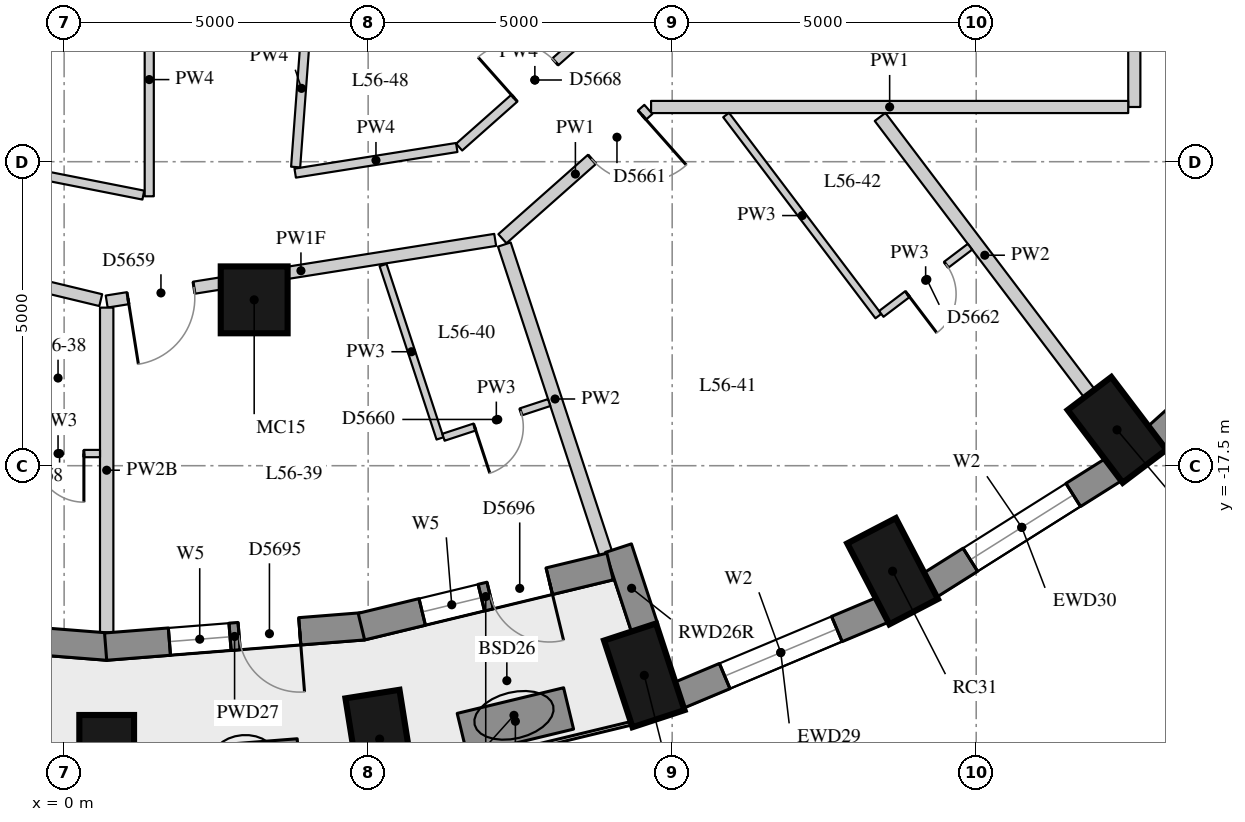
"""IFC4 building model, lengths in metres.
Left out: names, types, materials, properties, quantities, classifications, styles, units other than length and angle.
Written with IfcOpenShell. Run it as: python <this file> out.ifc"""

import sys

from ifc_helpers import new_model, si_unit, direction, frame, frame_2d, origin, origin_2d, place, context, subcontext, project, spatial, rectangle, extrude, element, fill, save


model = new_model("IFC4")
c1 = context("Model", 3, precision=1e-05, world=origin(), true_north=direction((0.0, 1.0)))
c2 = subcontext(c1, "Body", "Model", "MODEL_VIEW")
j1 = project(units=[si_unit("LENGTHUNIT", "METRE"), si_unit("PLANEANGLEUNIT", "RADIAN")], contexts=[c1])
p1 = place(None, origin())
s1 = spatial("IfcSite", under=j1, at=p1, CompositionType="ELEMENT")
p2 = place(p1, origin())
s2 = spatial("IfcBuilding", under=s1, at=p2, CompositionType="ELEMENT")
p3 = place(p2, frame((0.0, 0.0, 199.1)))
s3 = spatial("IfcBuildingStorey", under=s2, at=p3, CompositionType="ELEMENT", Elevation=199.1)
for number, where, z_axis, x_axis in (
    (1, (0.7, -22.35, 0.0), (0.0, 0.0, 1.0), (0.0, -1.0, 0.0)),
    (2, (5.189, -21.997, 0.0), (0.0, 0.0, 1.0), (0.157, -0.988, 0.0)),
    (3, (9.541, -20.948, 0.0), (0.0, 0.0, 1.0), (0.312, -0.95, 0.0)),
    (4, (13.625, -19.235, 0.0), (0.0, 0.0, 1.0), (0.462, -0.887, 0.0)),
    (5, (17.316, -16.911, 0.0), (0.0, 0.0, 1.0), (0.604, -0.797, 0.0)),
):
    element("IfcColumn", number, at=place(p3, frame(where, z_axis=z_axis, x_axis=x_axis)), inside=s3, PredefinedType="COLUMN", context=c2, shape_type="SweptSolid", body=[
        extrude(rectangle(XDim=1.5, YDim=0.9, at=origin_2d()), origin(), (0.0, 0.0, 1.0), 3.3),
    ])
p4 = place(p3, frame((3.126, -14.772, 0.0), z_axis=(0.0, 0.0, 1.0), x_axis=(1.0, 0.0, 0.0)))
e6 = element("IfcColumn", 6, at=p4, inside=s3, PredefinedType="COLUMN", context=c2, shape_type="SweptSolid", body=[
    extrude(rectangle(XDim=1.1, YDim=1.1, at=origin_2d()), origin(), (0.0, 0.0, 1.0), 3.3),
])
p5 = place(p3, frame((10.103, -21.279, 0.0), z_axis=(0.0, 0.0, 1.0), x_axis=(0.922168222612, 0.386789050006, 0.0)))
e7 = element("IfcWall", 7, at=p5, inside=s3, PredefinedType="SOLIDWALL", context=c2, shape_type="SweptSolid", body=[
    extrude(rectangle(XDim=3.651, YDim=0.45, at=frame_2d((1.825, 0.0))), origin(), (0.0, 0.0, 1.0), 3.02),
])
p6 = place(p5, frame((0.825, 0.0, 0.4)))
e8 = element("IfcOpeningElement", 8, at=p6, cuts=e7, PredefinedType="OPENING", context=c2, shape_type="SweptSolid", body=[
    extrude(rectangle(XDim=2.0, YDim=1.75, at=frame_2d((1.0, 0.875))), frame((0.0, 0.235, 0.0), z_axis=(0.0, -1.0, 0.0), x_axis=(1.0, 0.0, 0.0)), (0.0, 0.0, 1.0), 0.47),
])
p7 = place(p3, frame((14.232, -19.47, 0.0), z_axis=(0.0, 0.0, 1.0), x_axis=(0.84614984472, 0.532945063098, 0.0)))
e9 = element("IfcWall", 9, at=p7, inside=s3, PredefinedType="SOLIDWALL", context=c2, shape_type="SweptSolid", body=[
    extrude(rectangle(XDim=3.586, YDim=0.45, at=frame_2d((1.793, 0.0))), origin(), (0.0, 0.0, 1.0), 3.02),
])
p8 = place(p7, frame((0.793, 0.0, 0.4)))
e10 = element("IfcOpeningElement", 10, at=p8, cuts=e9, PredefinedType="OPENING", context=c2, shape_type="SweptSolid", body=[
    extrude(rectangle(XDim=2.0, YDim=1.75, at=frame_2d((1.0, 0.875))), frame((0.0, 0.235, 0.0), z_axis=(0.0, -1.0, 0.0), x_axis=(1.0, 0.0, 0.0)), (0.0, 0.0, 1.0), 0.47),
])
p9 = place(p3, frame((17.953, -17.04, 0.0), z_axis=(0.0, 0.0, 1.0), x_axis=(0.743442727602, 0.668799604348, 0.0)))
e11 = element("IfcWall", 11, at=p9, inside=s3, PredefinedType="SOLIDWALL", context=c2, shape_type="SweptSolid", body=[
    extrude(rectangle(XDim=3.513, YDim=0.45, at=frame_2d((1.756, 0.0))), origin(), (0.0, 0.0, 1.0), 3.02),
])
p10 = place(p3, frame((9.55, -20.177, 0.0), z_axis=(0.0, 0.0, 1.0), x_axis=(-0.31201065878, 0.950078601384, 0.0)))
e12 = element("IfcWall", 12, at=p10, inside=s3, PredefinedType="SOLIDWALL", context=c2, shape_type="SweptSolid", body=[
    extrude(rectangle(XDim=1.39, YDim=0.45, at=frame_2d((0.695, 0.0))), origin(), (0.0, 0.0, 1.0), 3.02),
])
p11 = place(p3, frame((-3.507, -20.142, 0.0), z_axis=(0.0, 0.0, 1.0), x_axis=(0.996902786213, -0.078643720926, 0.0)))
e13 = element("IfcWall", 13, at=p11, inside=s3, PredefinedType="SOLIDWALL", context=c2, shape_type="SweptSolid", body=[
    extrude(rectangle(XDim=4.238, YDim=0.45, at=frame_2d((2.119, 0.0))), origin(), (0.0, 0.0, 1.0), 3.02),
])
p12 = place(p11, frame((1.044, 0.0, 0.4)))
e14 = element("IfcOpeningElement", 14, at=p12, cuts=e13, PredefinedType="OPENING", context=c2, shape_type="SweptSolid", body=[
    extrude(rectangle(XDim=1.0, YDim=1.75, at=frame_2d((0.5, 0.875))), frame((0.0, 0.235, 0.0), z_axis=(0.0, -1.0, 0.0), x_axis=(1.0, 0.0, 0.0)), (0.0, 0.0, 1.0), 0.47),
])
p13 = place(p11, frame((2.194, 0.0, 0.0)))
e15 = element("IfcOpeningElement", 15, at=p13, cuts=e13, PredefinedType="OPENING", context=c2, shape_type="SweptSolid", body=[
    extrude(rectangle(XDim=1.0, YDim=2.15, at=frame_2d((0.5, 1.075))), frame((0.0, 0.235, 0.0), z_axis=(0.0, -1.0, 0.0), x_axis=(1.0, 0.0, 0.0)), (0.0, 0.0, 1.0), 0.47),
])
p14 = place(p3, frame((0.682, -20.476, 0.0), z_axis=(0.0, 0.0, 1.0), x_axis=(0.996901346333, 0.078661970983, 0.0)))
e16 = element("IfcWall", 16, at=p14, inside=s3, PredefinedType="SOLIDWALL", context=c2, shape_type="SweptSolid", body=[
    extrude(rectangle(XDim=4.255, YDim=0.45, at=frame_2d((2.127, 0.0))), origin(), (0.0, 0.0, 1.0), 3.02),
])
p15 = place(p14, frame((1.052, 0.0, 0.4)))
e17 = element("IfcOpeningElement", 17, at=p15, cuts=e16, PredefinedType="OPENING", context=c2, shape_type="SweptSolid", body=[
    extrude(rectangle(XDim=1.0, YDim=1.75, at=frame_2d((0.5, 0.875))), frame((0.0, 0.235, 0.0), z_axis=(0.0, -1.0, 0.0), x_axis=(1.0, 0.0, 0.0)), (0.0, 0.0, 1.0), 0.47),
])
p16 = place(p14, frame((2.203, 0.0, 0.0)))
e18 = element("IfcOpeningElement", 18, at=p16, cuts=e16, PredefinedType="OPENING", context=c2, shape_type="SweptSolid", body=[
    extrude(rectangle(XDim=1.0, YDim=2.15, at=frame_2d((0.5, 1.075))), frame((0.0, 0.235, 0.0), z_axis=(0.0, -1.0, 0.0), x_axis=(1.0, 0.0, 0.0)), (0.0, 0.0, 1.0), 0.47),
])
p17 = place(p3, frame((4.889, -20.146, 0.0), z_axis=(0.0, 0.0, 1.0), x_axis=(0.972004107579, 0.234963858602, 0.0)))
e19 = element("IfcWall", 19, at=p17, inside=s3, PredefinedType="SOLIDWALL", context=c2, shape_type="SweptSolid", body=[
    extrude(rectangle(XDim=4.207, YDim=0.45, at=frame_2d((2.104, 0.0))), origin(), (0.0, 0.0, 1.0), 3.02),
])
p18 = place(p17, frame((1.029, 0.0, 0.4)))
e20 = element("IfcOpeningElement", 20, at=p18, cuts=e19, PredefinedType="OPENING", context=c2, shape_type="SweptSolid", body=[
    extrude(rectangle(XDim=1.0, YDim=1.75, at=frame_2d((0.5, 0.875))), frame((0.0, 0.235, 0.0), z_axis=(0.0, -1.0, 0.0), x_axis=(1.0, 0.0, 0.0)), (0.0, 0.0, 1.0), 0.47),
])
p19 = place(p17, frame((2.179, 0.0, 0.0)))
e21 = element("IfcOpeningElement", 21, at=p19, cuts=e19, PredefinedType="OPENING", context=c2, shape_type="SweptSolid", body=[
    extrude(rectangle(XDim=1.0, YDim=2.15, at=frame_2d((0.5, 1.075))), frame((0.0, 0.235, 0.0), z_axis=(0.0, -1.0, 0.0), x_axis=(1.0, 0.0, 0.0)), (0.0, 0.0, 1.0), 0.47),
])
for number, where, z_axis, x_axis in (
    (22, (2.066, -22.481, 0.0), (0.0, 0.0, 1.0), (0.997, 0.079, 0.0)),
    (23, (6.546, -21.914, 0.0), (0.0, 0.0, 1.0), (0.972, 0.234, 0.0)),
):
    element("IfcWall", number, at=place(p3, frame(where, z_axis=z_axis, x_axis=x_axis)), inside=s3, PredefinedType="USERDEFINED", context=c2, shape_type="SweptSolid", body=[
        extrude(rectangle(XDim=1.8, YDim=0.7, at=frame_2d((0.9, 0.0))), origin(), (0.0, 0.0, 1.0), 0.75),
    ])
p20 = place(p3, frame((17.6, -4.617, 0.0), z_axis=(0.0, 0.0, 1.0), x_axis=(0.0, -1.0, 0.0)))
e24 = element("IfcWall", 24, at=p20, inside=s3, PredefinedType="PARTITIONING", context=c2, shape_type="SweptSolid", body=[
    extrude(rectangle(XDim=6.983, YDim=0.2, at=frame_2d((3.492, 0.0))), origin(), (0.0, 0.0, 1.0), 3.02),
])
p21 = place(p20, frame((2.592, 0.0, 0.0)))
e25 = element("IfcOpeningElement", 25, at=p21, cuts=e24, PredefinedType="OPENING", context=c2, shape_type="SweptSolid", body=[
    extrude(rectangle(XDim=1.8, YDim=2.1, at=frame_2d((0.9, 1.05))), frame((0.0, 0.11, 0.0), z_axis=(0.0, -1.0, 0.0), x_axis=(1.0, 0.0, 0.0)), (0.0, 0.0, 1.0), 0.22),
])
p22 = place(p3, frame((17.5, -11.6, 0.0), z_axis=(0.0, 0.0, 1.0), x_axis=(-1.0, 0.0, 0.0)))
e26 = element("IfcWall", 26, at=p22, inside=s3, PredefinedType="PARTITIONING", context=c2, shape_type="SweptSolid", body=[
    extrude(rectangle(XDim=7.847, YDim=0.2, at=frame_2d((3.923, 0.0))), origin(), (0.0, 0.0, 1.0), 3.02),
])
p23 = place(p3, frame((9.608, -11.64, 0.0), z_axis=(0.0, 0.0, 1.0), x_axis=(-0.748412200225, -0.663233879227, 0.0)))
e27 = element("IfcWall", 27, at=p23, inside=s3, PredefinedType="PARTITIONING", context=c2, shape_type="SweptSolid", body=[
    extrude(rectangle(XDim=3.207, YDim=0.2, at=frame_2d((1.604, 0.0))), origin(), (0.0, 0.0, 1.0), 3.02),
])
p24 = place(p23, frame((0.14, 0.0, 0.0)))
e28 = element("IfcOpeningElement", 28, at=p24, cuts=e27, PredefinedType="OPENING", context=c2, shape_type="SweptSolid", body=[
    extrude(rectangle(XDim=1.1, YDim=2.1, at=frame_2d((0.55, 1.05))), frame((0.0, 0.11, 0.0), z_axis=(0.0, -1.0, 0.0), x_axis=(1.0, 0.0, 0.0)), (0.0, 0.0, 1.0), 0.22),
])
p25 = place(p3, frame((7.089, -13.786, 0.0), z_axis=(0.0, 0.0, 1.0), x_axis=(-0.987636270411, -0.156762869867, 0.0)))
e29 = element("IfcWall", 29, at=p25, inside=s3, PredefinedType="PARTITIONING", context=c2, shape_type="SweptSolid", body=[
    extrude(rectangle(XDim=6.469, YDim=0.2, at=frame_2d((3.235, 0.0))), origin(), (0.0, 0.0, 1.0), 2.42),
])
p26 = place(p25, frame((5.016, 0.0, 0.0)))
e30 = element("IfcOpeningElement", 30, at=p26, cuts=e29, PredefinedType="OPENING", context=c2, shape_type="SweptSolid", body=[
    extrude(rectangle(XDim=1.1, YDim=2.1, at=frame_2d((0.55, 1.05))), frame((0.0, 0.11, 0.0), z_axis=(0.0, -1.0, 0.0), x_axis=(1.0, 0.0, 0.0)), (0.0, 0.0, 1.0), 0.22),
])
p27 = place(p3, frame((0.602, -14.777, 0.0), z_axis=(0.0, 0.0, 1.0), x_axis=(-0.972266752798, 0.23387467029, 0.0)))
e31 = element("IfcWall", 31, at=p27, inside=s3, PredefinedType="PARTITIONING", context=c2, shape_type="SweptSolid", body=[
    extrude(rectangle(XDim=8.539, YDim=0.2, at=frame_2d((4.27, 0.0))), origin(), (0.0, 0.0, 1.0), 2.42),
])
p28 = place(p27, frame((7.016, 0.0, 0.0)))
e32 = element("IfcOpeningElement", 32, at=p28, cuts=e31, PredefinedType="OPENING", context=c2, shape_type="SweptSolid", body=[
    extrude(rectangle(XDim=0.9, YDim=2.1, at=frame_2d((0.45, 1.05))), frame((0.0, 0.11, 0.0), z_axis=(0.0, -1.0, 0.0), x_axis=(1.0, 0.0, 0.0)), (0.0, 0.0, 1.0), 0.22),
])
p29 = place(p27, frame((4.565, 0.0, 0.0)))
e33 = element("IfcOpeningElement", 33, at=p29, cuts=e31, PredefinedType="OPENING", context=c2, shape_type="SweptSolid", body=[
    extrude(rectangle(XDim=0.9, YDim=2.1, at=frame_2d((0.45, 1.05))), frame((0.0, 0.11, 0.0), z_axis=(0.0, -1.0, 0.0), x_axis=(1.0, 0.0, 0.0)), (0.0, 0.0, 1.0), 0.22),
])
p30 = place(p27, frame((1.78, 0.0, 0.0)))
e34 = element("IfcOpeningElement", 34, at=p30, cuts=e31, PredefinedType="OPENING", context=c2, shape_type="SweptSolid", body=[
    extrude(rectangle(XDim=0.9, YDim=2.1, at=frame_2d((0.45, 1.05))), frame((0.0, 0.11, 0.0), z_axis=(0.0, -1.0, 0.0), x_axis=(1.0, 0.0, 0.0)), (0.0, 0.0, 1.0), 0.22),
])
p31 = place(p3, frame((1.4, -9.23, 0.0), z_axis=(0.0, 0.0, 1.0), x_axis=(0.0, -1.0, 0.0)))
e35 = element("IfcWall", 35, at=p31, inside=s3, PredefinedType="PARTITIONING", context=c2, shape_type="SweptSolid", body=[
    extrude(rectangle(XDim=3.839, YDim=0.15, at=frame_2d((1.919, 0.0))), origin(), (0.0, 0.0, 1.0), 3.02),
])
p32 = place(p3, frame((1.302, -13.049, 0.0), z_axis=(0.0, 0.0, 1.0), x_axis=(-0.981063502149, 0.193686356647, 0.0)))
e36 = element("IfcWall", 36, at=p32, inside=s3, PredefinedType="PARTITIONING", context=c2, shape_type="SweptSolid", body=[
    extrude(rectangle(XDim=5.914, YDim=0.15, at=frame_2d((2.957, 0.0))), origin(), (0.0, 0.0, 1.0), 3.02),
])
p33 = place(p3, frame((8.987, -10.052, 0.0), z_axis=(0.0, 0.0, 1.0), x_axis=(-0.74833949077, -0.66331591761, 0.0)))
e37 = element("IfcWall", 37, at=p33, inside=s3, PredefinedType="PARTITIONING", context=c2, shape_type="SweptSolid", body=[
    extrude(rectangle(XDim=3.328, YDim=0.15, at=frame_2d((1.664, 0.0))), origin(), (0.0, 0.0, 1.0), 3.02),
])
p34 = place(p33, frame((1.214, 0.0, 0.0)))
e38 = element("IfcOpeningElement", 38, at=p34, cuts=e37, PredefinedType="OPENING", context=c2, shape_type="SweptSolid", body=[
    extrude(rectangle(XDim=0.9, YDim=2.1, at=frame_2d((0.45, 1.05))), frame((0.0, 0.085, 0.0), z_axis=(0.0, -1.0, 0.0), x_axis=(1.0, 0.0, 0.0)), (0.0, 0.0, 1.0), 0.17),
])
p35 = place(p3, frame((6.457, -12.266, 0.0), z_axis=(0.0, 0.0, 1.0), x_axis=(-0.987639766053, -0.156740845063, 0.0)))
e39 = element("IfcWall", 39, at=p35, inside=s3, PredefinedType="PARTITIONING", context=c2, shape_type="SweptSolid", body=[
    extrude(rectangle(XDim=2.69, YDim=0.15, at=frame_2d((1.345, 0.0))), origin(), (0.0, 0.0, 1.0), 3.02),
])
p36 = place(p3, frame((3.807, -12.588, 0.0), z_axis=(0.0, 0.0, 1.0), x_axis=(0.07420077159, 0.997243323114, 0.0)))
e40 = element("IfcWall", 40, at=p36, inside=s3, PredefinedType="PARTITIONING", context=c2, shape_type="SweptSolid", body=[
    extrude(rectangle(XDim=2.596, YDim=0.15, at=frame_2d((1.298, 0.0))), origin(), (0.0, 0.0, 1.0), 3.02),
])
p37 = place(p3, frame((0.7, -20.249, 0.0), z_axis=(0.0, 0.0, 1.0), x_axis=(0.0, 1.0, 0.0)))
e41 = element("IfcWall", 41, at=p37, inside=s3, PredefinedType="PARTITIONING", context=c2, shape_type="SweptSolid", body=[
    extrude(rectangle(XDim=5.348, YDim=0.22, at=frame_2d((2.674, 0.0))), origin(), (0.0, 0.0, 1.0), 2.57),
])
p38 = place(p3, frame((8.908, -18.944, 0.0), z_axis=(0.0, 0.0, 1.0), x_axis=(-0.311910788491, 0.950111393481, 0.0)))
e42 = element("IfcWall", 42, at=p38, inside=s3, PredefinedType="PARTITIONING", context=c2, shape_type="SweptSolid", body=[
    extrude(rectangle(XDim=5.348, YDim=0.22, at=frame_2d((2.674, 0.0))), origin(), (0.0, 0.0, 1.0), 3.02),
])
p39 = place(p3, frame((16.863, -16.312, 0.0), z_axis=(0.0, 0.0, 1.0), x_axis=(-0.603636051313, 0.797260006243, 0.0)))
e43 = element("IfcWall", 43, at=p39, inside=s3, PredefinedType="PARTITIONING", context=c2, shape_type="SweptSolid", body=[
    extrude(rectangle(XDim=5.706, YDim=0.22, at=frame_2d((2.853, 0.0))), origin(), (0.0, 0.0, 1.0), 3.02),
])
p40 = place(p3, frame((5.245, -14.2, 0.0), z_axis=(0.0, 0.0, 1.0), x_axis=(0.31202743032, -0.950073093361, 0.0)))
e44 = element("IfcWall", 44, at=p40, inside=s3, PredefinedType="PARTITIONING", context=c2, shape_type="SweptSolid", body=[
    extrude(rectangle(XDim=3.001, YDim=0.12, at=frame_2d((1.501, 0.0))), origin(), (0.0, 0.0, 1.0), 3.02),
])
p41 = place(p3, frame((10.887, -11.732, 0.0), z_axis=(0.0, 0.0, 1.0), x_axis=(0.603646932038, -0.797251767913, 0.0)))
e45 = element("IfcWall", 45, at=p41, inside=s3, PredefinedType="PARTITIONING", context=c2, shape_type="SweptSolid", body=[
    extrude(rectangle(XDim=4.149, YDim=0.12, at=frame_2d((2.074, 0.0))), origin(), (0.0, 0.0, 1.0), 3.02),
])
p42 = place(p3, frame((-0.79, -17.3, 0.0), z_axis=(0.0, 0.0, 1.0), x_axis=(1.0, 0.0, 0.0)))
e46 = element("IfcWall", 46, at=p42, inside=s3, PredefinedType="PARTITIONING", context=c2, shape_type="SweptSolid", body=[
    extrude(rectangle(XDim=1.38, YDim=0.12, at=frame_2d((0.69, 0.0))), origin(), (0.0, 0.0, 1.0), 3.02),
])
p43 = place(p42, frame((0.315, 0.0, 0.0)))
e47 = element("IfcOpeningElement", 47, at=p43, cuts=e46, PredefinedType="OPENING", context=c2, shape_type="SweptSolid", body=[
    extrude(rectangle(XDim=0.8, YDim=2.1, at=frame_2d((0.4, 1.05))), frame((0.0, 0.07, 0.0), z_axis=(0.0, -1.0, 0.0), x_axis=(1.0, 0.0, 0.0)), (0.0, 0.0, 1.0), 0.14),
])
p44 = place(p3, frame((6.239, -17.032, 0.0), z_axis=(0.0, 0.0, 1.0), x_axis=(0.950127811882, 0.311860771962, 0.0)))
e48 = element("IfcWall", 48, at=p44, inside=s3, PredefinedType="PARTITIONING", context=c2, shape_type="SweptSolid", body=[
    extrude(rectangle(XDim=1.83, YDim=0.12, at=frame_2d((0.915, 0.0))), origin(), (0.0, 0.0, 1.0), 3.02),
])
p45 = place(p44, frame((0.54, 0.0, 0.0)))
e49 = element("IfcOpeningElement", 49, at=p45, cuts=e48, PredefinedType="OPENING", context=c2, shape_type="SweptSolid", body=[
    extrude(rectangle(XDim=0.8, YDim=2.1, at=frame_2d((0.4, 1.05))), frame((0.0, 0.07, 0.0), z_axis=(0.0, -1.0, 0.0), x_axis=(1.0, 0.0, 0.0)), (0.0, 0.0, 1.0), 0.14),
])
p46 = place(p3, frame((13.439, -15.003, 0.0), z_axis=(0.0, 0.0, 1.0), x_axis=(0.797238062708, 0.603665032422, 0.0)))
e50 = element("IfcWall", 50, at=p46, inside=s3, PredefinedType="PARTITIONING", context=c2, shape_type="SweptSolid", body=[
    extrude(rectangle(XDim=1.83, YDim=0.12, at=frame_2d((0.915, 0.0))), origin(), (0.0, 0.0, 1.0), 3.02),
])
p47 = place(p46, frame((0.54, 0.0, 0.0)))
e51 = element("IfcOpeningElement", 51, at=p47, cuts=e50, PredefinedType="OPENING", context=c2, shape_type="SweptSolid", body=[
    extrude(rectangle(XDim=0.8, YDim=2.1, at=frame_2d((0.4, 1.05))), frame((0.0, 0.07, 0.0), z_axis=(0.0, -1.0, 0.0), x_axis=(1.0, 0.0, 0.0)), (0.0, 0.0, 1.0), 0.14),
])
p48 = place(p6, origin())
e52 = element("IfcWindow", 52, at=p48, inside=s3, PartitioningType="SINGLE_PANEL", PredefinedType="WINDOW", context=c2, shape_type="SweptSolid", body=[
    extrude(rectangle(XDim=2.0, YDim=1.75, at=frame_2d((1.0, 0.875))), frame((0.0, 0.035, 0.0), z_axis=(0.0, -1.0, 0.0), x_axis=(1.0, 0.0, 0.0)), (0.0, 0.0, 1.0), 0.06),
])
fill(e8, e52)
p49 = place(p8, origin())
e53 = element("IfcWindow", 53, at=p49, inside=s3, PartitioningType="SINGLE_PANEL", PredefinedType="WINDOW", context=c2, shape_type="SweptSolid", body=[
    extrude(rectangle(XDim=2.0, YDim=1.75, at=frame_2d((1.0, 0.875))), frame((0.0, 0.035, 0.0), z_axis=(0.0, -1.0, 0.0), x_axis=(1.0, 0.0, 0.0)), (0.0, 0.0, 1.0), 0.06),
])
fill(e10, e53)
p50 = place(p15, origin())
e54 = element("IfcWindow", 54, at=p50, inside=s3, PartitioningType="SINGLE_PANEL", PredefinedType="WINDOW", context=c2, shape_type="SweptSolid", body=[
    extrude(rectangle(XDim=1.0, YDim=1.75, at=frame_2d((0.5, 0.875))), frame((0.0, 0.035, 0.0), z_axis=(0.0, -1.0, 0.0), x_axis=(1.0, 0.0, 0.0)), (0.0, 0.0, 1.0), 0.06),
])
fill(e17, e54)
p51 = place(p16, frame((1.0, 0.0, 0.0), z_axis=(0.0, 0.0, 1.0), x_axis=(-1.0, 0.0, 0.0)))
e55 = element("IfcDoor", 55, at=p51, inside=s3, OperationType="SINGLE_SWING_LEFT", PredefinedType="DOOR", context=c2, shape_type="SweptSolid", body=[
    extrude(rectangle(XDim=1.0, YDim=2.15, at=frame_2d((0.5, 1.075))), frame((0.0, 0.075, 0.0), z_axis=(0.0, -1.0, 0.0), x_axis=(1.0, 0.0, 0.0)), (0.0, 0.0, 1.0), 0.05),
])
fill(e18, e55)
p52 = place(p18, origin())
e56 = element("IfcWindow", 56, at=p52, inside=s3, PartitioningType="SINGLE_PANEL", PredefinedType="WINDOW", context=c2, shape_type="SweptSolid", body=[
    extrude(rectangle(XDim=1.0, YDim=1.75, at=frame_2d((0.5, 0.875))), frame((0.0, 0.035, 0.0), z_axis=(0.0, -1.0, 0.0), x_axis=(1.0, 0.0, 0.0)), (0.0, 0.0, 1.0), 0.06),
])
fill(e20, e56)
p53 = place(p19, frame((1.0, 0.0, 0.0), z_axis=(0.0, 0.0, 1.0), x_axis=(-1.0, 0.0, 0.0)))
e57 = element("IfcDoor", 57, at=p53, inside=s3, OperationType="SINGLE_SWING_LEFT", PredefinedType="DOOR", context=c2, shape_type="SweptSolid", body=[
    extrude(rectangle(XDim=1.0, YDim=2.15, at=frame_2d((0.5, 1.075))), frame((0.0, 0.075, 0.0), z_axis=(0.0, -1.0, 0.0), x_axis=(1.0, 0.0, 0.0)), (0.0, 0.0, 1.0), 0.05),
])
fill(e21, e57)
p54 = place(p43, origin())
e58 = element("IfcDoor", 58, at=p54, inside=s3, OperationType="SINGLE_SWING_LEFT", PredefinedType="DOOR", context=c2, shape_type="SweptSolid", body=[
    extrude(rectangle(XDim=0.8, YDim=2.1, at=frame_2d((0.4, 1.05))), frame((0.0, 0.025, 0.0), z_axis=(0.0, -1.0, 0.0), x_axis=(1.0, 0.0, 0.0)), (0.0, 0.0, 1.0), 0.05),
])
fill(e47, e58)
p55 = place(p26, origin())
e59 = element("IfcDoor", 59, at=p55, inside=s3, OperationType="SINGLE_SWING_RIGHT", PredefinedType="DOOR", context=c2, shape_type="SweptSolid", body=[
    extrude(rectangle(XDim=1.1, YDim=2.1, at=frame_2d((0.55, 1.05))), frame((0.0, 0.025, 0.0), z_axis=(0.0, -1.0, 0.0), x_axis=(1.0, 0.0, 0.0)), (0.0, 0.0, 1.0), 0.05),
])
fill(e30, e59)
p56 = place(p45, origin())
e60 = element("IfcDoor", 60, at=p56, inside=s3, OperationType="SINGLE_SWING_RIGHT", PredefinedType="DOOR", context=c2, shape_type="SweptSolid", body=[
    extrude(rectangle(XDim=0.8, YDim=2.1, at=frame_2d((0.4, 1.05))), frame((0.0, 0.025, 0.0), z_axis=(0.0, -1.0, 0.0), x_axis=(1.0, 0.0, 0.0)), (0.0, 0.0, 1.0), 0.05),
])
fill(e49, e60)
p57 = place(p24, origin())
e61 = element("IfcDoor", 61, at=p57, inside=s3, OperationType="SINGLE_SWING_LEFT", PredefinedType="DOOR", context=c2, shape_type="SweptSolid", body=[
    extrude(rectangle(XDim=1.1, YDim=2.1, at=frame_2d((0.55, 1.05))), frame((0.0, 0.025, 0.0), z_axis=(0.0, -1.0, 0.0), x_axis=(1.0, 0.0, 0.0)), (0.0, 0.0, 1.0), 0.05),
])
fill(e28, e61)
p58 = place(p47, origin())
e62 = element("IfcDoor", 62, at=p58, inside=s3, OperationType="SINGLE_SWING_RIGHT", PredefinedType="DOOR", context=c2, shape_type="SweptSolid", body=[
    extrude(rectangle(XDim=0.8, YDim=2.1, at=frame_2d((0.4, 1.05))), frame((0.0, 0.025, 0.0), z_axis=(0.0, -1.0, 0.0), x_axis=(1.0, 0.0, 0.0)), (0.0, 0.0, 1.0), 0.05),
])
fill(e51, e62)
p59 = place(p34, origin())
e63 = element("IfcDoor", 63, at=p59, inside=s3, OperationType="SINGLE_SWING_LEFT", PredefinedType="DOOR", context=c2, shape_type="SweptSolid", body=[
    extrude(rectangle(XDim=0.9, YDim=2.1, at=frame_2d((0.45, 1.05))), frame((0.0, 0.025, 0.0), z_axis=(0.0, -1.0, 0.0), x_axis=(1.0, 0.0, 0.0)), (0.0, 0.0, 1.0), 0.05),
])
fill(e38, e63)
save(model, sys.argv[1])
